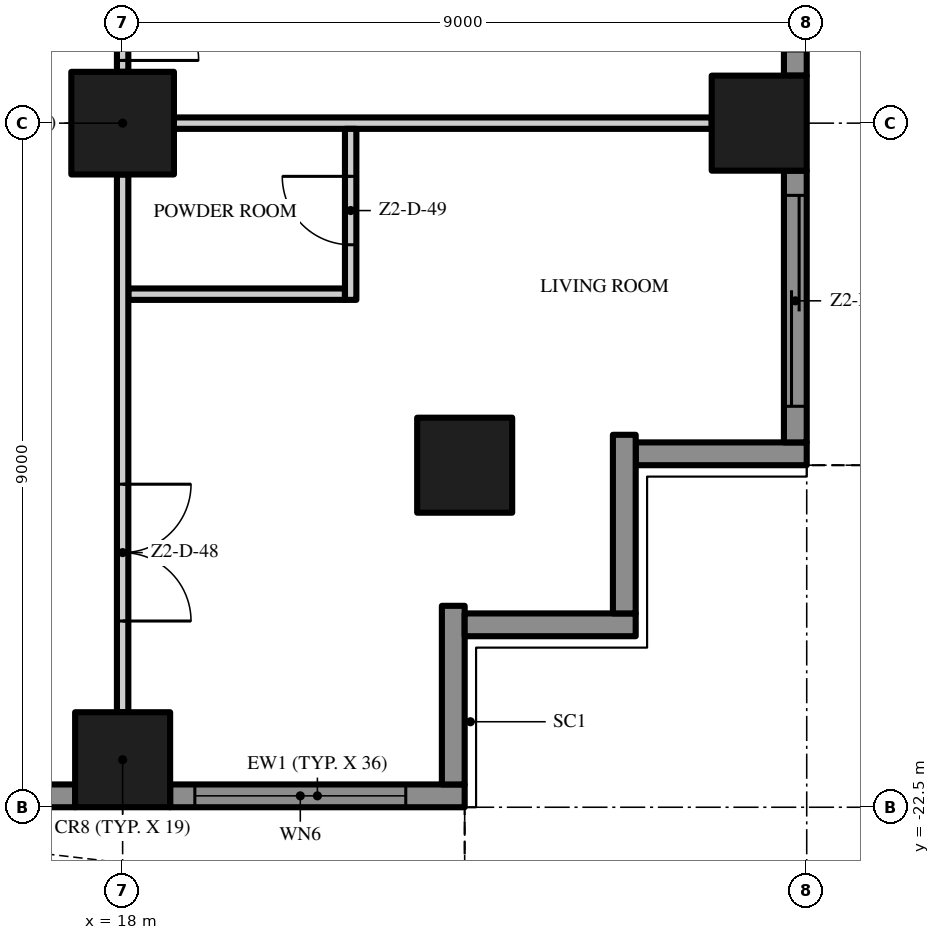
"""IFC4 building model, lengths in metres.
Left out: names, types, materials, properties, quantities, classifications, styles, units other than length and angle.
Written with IfcOpenShell. Run it as: python <this file> out.ifc"""

import sys

from ifc_helpers import new_model, si_unit, direction, frame, frame_2d, origin, origin_2d, place, context, subcontext, project, spatial, polyline, rectangle, outline, extrude, element, fill, save


model = new_model("IFC4")
c1 = context("Model", 3, precision=1e-05, world=origin(), true_north=direction((0.0, 1.0)))
c2 = subcontext(c1, "Body", "Model", "MODEL_VIEW")
j1 = project(units=[si_unit("LENGTHUNIT", "METRE"), si_unit("PLANEANGLEUNIT", "RADIAN")], contexts=[c1])
p1 = place(None, origin())
s1 = spatial("IfcSite", under=j1, at=p1, CompositionType="ELEMENT")
p2 = place(p1, origin())
s2 = spatial("IfcBuilding", under=s1, at=p2, CompositionType="ELEMENT")
p3 = place(p2, frame((0.0, 0.0, 111.2)))
s3 = spatial("IfcBuildingStorey", under=s2, at=p3, CompositionType="ELEMENT", Elevation=111.2)
p4 = place(p3, frame((18.0, -13.5, 0.0), z_axis=(0.0, 0.0, 1.0), x_axis=(1.0, 0.0, 0.0)))
e1 = element("IfcColumn", 1, at=p4, inside=s3, PredefinedType="COLUMN", context=c2, shape_type="SweptSolid", body=[
    extrude(rectangle(XDim=1.35, YDim=1.35, at=origin_2d()), origin(), (0.0, 0.0, 1.0), 3.5),
])
for number, where, z_axis, x_axis in (
    (2, (18.0, -21.875, 0.0), (0.0, 0.0, 1.0), (1.0, 0.0, 0.0)),
    (3, (26.375, -13.5, 0.0), (0.0, 0.0, 1.0), (1.0, 0.0, 0.0)),
    (4, (22.5, -18.0, 0.0), (0.0, 0.0, 1.0), (1.0, 0.0, 0.0)),
):
    element("IfcColumn", number, at=place(p3, frame(where, z_axis=z_axis, x_axis=x_axis)), inside=s3, PredefinedType="COLUMN", context=c2, shape_type="SweptSolid", body=[
        extrude(rectangle(XDim=1.25, YDim=1.25, at=origin_2d()), origin(), (0.0, 0.0, 1.0), 3.5),
    ])
p5 = place(p3, frame((17.375, -22.35, 0.0), z_axis=(0.0, 0.0, 1.0), x_axis=(-1.0, 0.0, 0.0)))
e5 = element("IfcWall", 5, at=p5, inside=s3, PredefinedType="SOLIDWALL", context=c2, shape_type="SweptSolid", body=[
    extrude(rectangle(XDim=7.75, YDim=0.3, at=frame_2d((3.875, 0.0))), origin(), (0.0, 0.0, 1.0), 3.5),
])
p6 = place(p5, frame((4.65, 0.0, 0.0)))
e6 = element("IfcOpeningElement", 6, at=p6, cuts=e5, PredefinedType="OPENING", context=c2, shape_type="SweptSolid", body=[
    extrude(rectangle(XDim=2.775, YDim=2.4, at=frame_2d((1.387, 1.2))), frame((0.0, 0.16, 0.0), z_axis=(0.0, -1.0, 0.0), x_axis=(1.0, 0.0, 0.0)), (0.0, 0.0, 1.0), 0.32),
])
p7 = place(p5, frame((0.325, 0.0, 0.45)))
e7 = element("IfcOpeningElement", 7, at=p7, cuts=e5, PredefinedType="OPENING", context=c2, shape_type="SweptSolid", body=[
    extrude(rectangle(XDim=2.775, YDim=2.65, at=frame_2d((1.387, 1.325))), frame((0.0, 0.16, 0.0), z_axis=(0.0, -1.0, 0.0), x_axis=(1.0, 0.0, 0.0)), (0.0, 0.0, 1.0), 0.32),
])
p8 = place(p3, frame((22.5, -22.35, 0.0), z_axis=(0.0, 0.0, 1.0), x_axis=(-1.0, 0.0, 0.0)))
e8 = element("IfcWall", 8, at=p8, inside=s3, PredefinedType="SOLIDWALL", context=c2, shape_type="SweptSolid", body=[
    extrude(rectangle(XDim=3.875, YDim=0.3, at=frame_2d((1.938, 0.0))), origin(), (0.0, 0.0, 1.0), 3.5),
])
p9 = place(p8, frame((0.775, 0.0, 0.45)))
e9 = element("IfcOpeningElement", 9, at=p9, cuts=e8, PredefinedType="OPENING", context=c2, shape_type="SweptSolid", body=[
    extrude(rectangle(XDim=2.775, YDim=2.65, at=frame_2d((1.387, 1.325))), frame((0.0, 0.16, 0.0), z_axis=(0.0, -1.0, 0.0), x_axis=(1.0, 0.0, 0.0)), (0.0, 0.0, 1.0), 0.32),
])
p10 = place(p3, frame((22.35, -19.85, 0.0), z_axis=(0.0, 0.0, 1.0), x_axis=(0.0, -1.0, 0.0)))
e10 = element("IfcWall", 10, at=p10, inside=s3, PredefinedType="SOLIDWALL", context=c2, shape_type="SweptSolid", body=[
    extrude(rectangle(XDim=2.35, YDim=0.3, at=frame_2d((1.175, 0.0))), origin(), (0.0, 0.0, 1.0), 3.5),
])
p11 = place(p3, frame((24.75, -20.1, 0.0), z_axis=(0.0, 0.0, 1.0), x_axis=(-1.0, 0.0, 0.0)))
e11 = element("IfcWall", 11, at=p11, inside=s3, PredefinedType="SOLIDWALL", context=c2, shape_type="SweptSolid", body=[
    extrude(rectangle(XDim=2.25, YDim=0.3, at=frame_2d((1.125, 0.0))), origin(), (0.0, 0.0, 1.0), 3.5),
])
p12 = place(p3, frame((24.6, -17.6, 0.0), z_axis=(0.0, 0.0, 1.0), x_axis=(0.0, -1.0, 0.0)))
e12 = element("IfcWall", 12, at=p12, inside=s3, PredefinedType="SOLIDWALL", context=c2, shape_type="SweptSolid", body=[
    extrude(rectangle(XDim=2.35, YDim=0.3, at=frame_2d((1.175, 0.0))), origin(), (0.0, 0.0, 1.0), 3.5),
])
p13 = place(p3, frame((27.0, -17.85, 0.0), z_axis=(0.0, 0.0, 1.0), x_axis=(-1.0, 0.0, 0.0)))
e13 = element("IfcWall", 13, at=p13, inside=s3, PredefinedType="SOLIDWALL", context=c2, shape_type="SweptSolid", body=[
    extrude(rectangle(XDim=2.25, YDim=0.3, at=frame_2d((1.125, 0.0))), origin(), (0.0, 0.0, 1.0), 3.5),
])
p14 = place(p3, frame((26.85, -14.125, 0.0), z_axis=(0.0, 0.0, 1.0), x_axis=(0.0, -1.0, 0.0)))
e14 = element("IfcWall", 14, at=p14, inside=s3, PredefinedType="SOLIDWALL", context=c2, shape_type="SweptSolid", body=[
    extrude(rectangle(XDim=3.575, YDim=0.3, at=frame_2d((1.788, 0.0))), origin(), (0.0, 0.0, 1.0), 3.5),
])
p15 = place(p14, frame((0.325, 0.0, 0.0)))
e15 = element("IfcOpeningElement", 15, at=p15, cuts=e14, PredefinedType="OPENING", context=c2, shape_type="SweptSolid", body=[
    extrude(rectangle(XDim=2.775, YDim=2.4, at=frame_2d((1.387, 1.2))), frame((0.0, 0.16, 0.0), z_axis=(0.0, -1.0, 0.0), x_axis=(1.0, 0.0, 0.0)), (0.0, 0.0, 1.0), 0.32),
])
p16 = place(p3, frame((26.85, -5.125, 0.0), z_axis=(0.0, 0.0, 1.0), x_axis=(0.0, -1.0, 0.0)))
e16 = element("IfcWall", 16, at=p16, inside=s3, PredefinedType="SOLIDWALL", context=c2, shape_type="SweptSolid", body=[
    extrude(rectangle(XDim=7.75, YDim=0.3, at=frame_2d((3.875, 0.0))), origin(), (0.0, 0.0, 1.0), 3.5),
])
p17 = place(p16, frame((4.65, 0.0, 0.45)))
e17 = element("IfcOpeningElement", 17, at=p17, cuts=e16, PredefinedType="OPENING", context=c2, shape_type="SweptSolid", body=[
    extrude(rectangle(XDim=2.775, YDim=2.65, at=frame_2d((1.387, 1.325))), frame((0.0, 0.16, 0.0), z_axis=(0.0, -1.0, 0.0), x_axis=(1.0, 0.0, 0.0)), (0.0, 0.0, 1.0), 0.32),
])
p18 = place(p16, frame((0.325, 0.0, 0.45)))
e18 = element("IfcOpeningElement", 18, at=p18, cuts=e16, PredefinedType="OPENING", context=c2, shape_type="SweptSolid", body=[
    extrude(rectangle(XDim=2.775, YDim=2.65, at=frame_2d((1.387, 1.325))), frame((0.0, 0.16, 0.0), z_axis=(0.0, -1.0, 0.0), x_axis=(1.0, 0.0, 0.0)), (0.0, 0.0, 1.0), 0.32),
])
p19 = place(p3, origin())
e19 = element("IfcWall", 19, at=p19, inside=s3, PredefinedType="USERDEFINED", context=c2, shape_type="SweptSolid", body=[
    extrude(outline(polyline([(-22.5, -25.149), (-21.0, -25.485), (-20.625, -25.5), (-19.5, -25.369), (-18.0, -24.845), (-16.5, -24.112), (-15.0, -23.451), (-13.5, -23.115), (-13.125, -23.1), (-12.0, -23.231), (-10.5, -23.755), (-9.0, -24.488), (-7.5, -25.149), (-6.0, -25.485), (-5.625, -25.5), (-4.5, -25.369), (-3.0, -24.845), (-1.5, -24.112), (0.0, -23.451), (1.5, -23.115), (1.875, -23.1), (3.0, -23.231), (4.5, -23.755), (6.0, -24.488), (7.5, -25.149), (9.0, -25.485), (9.375, -25.5), (10.5, -25.369), (12.0, -24.845), (13.5, -24.112), (15.0, -23.451), (16.5, -23.115), (16.875, -23.1), (18.0, -23.231), (19.5, -23.755), (21.0, -24.488), (22.5, -25.149), (22.601, -24.92), (21.105, -24.261), (19.596, -23.524), (18.056, -22.986), (16.885, -22.849), (16.467, -22.866), (14.921, -23.213), (13.395, -23.885), (11.904, -24.614), (10.444, -25.124), (9.365, -25.249), (9.033, -25.236), (7.579, -24.91), (6.105, -24.261), (4.596, -23.524), (3.056, -22.986), (1.885, -22.849), (1.467, -22.866), (-0.079, -23.213), (-1.605, -23.885), (-3.096, -24.614), (-4.556, -25.124), (-5.635, -25.249), (-5.967, -25.236), (-7.421, -24.91), (-8.895, -24.261), (-10.404, -23.524), (-11.944, -22.986), (-13.115, -22.849), (-13.533, -22.866), (-15.079, -23.213), (-16.605, -23.885), (-18.096, -24.614), (-19.556, -25.124), (-20.635, -25.249), (-20.967, -25.236), (-22.445, -24.905), (-22.5, -25.149)])), origin(), (0.0, 0.0, 1.0), 0.9),
])
p20 = place(p3, origin())
e20 = element("IfcWall", 20, at=p20, inside=s3, PredefinedType="USERDEFINED", context=c2, shape_type="SweptSolid", body=[
    extrude(outline(polyline([(29.649, -18.0), (29.985, -16.5), (30.0, -16.125), (29.869, -15.0), (29.345, -13.5), (28.612, -12.0), (27.951, -10.5), (27.615, -9.0), (27.6, -8.625), (27.731, -7.5), (28.255, -6.0), (28.988, -4.5), (29.649, -3.0), (29.985, -1.5), (30.0, -1.125), (29.869, 0.0), (29.345, 1.5), (28.612, 3.0), (27.951, 4.5), (27.615, 6.0), (27.6, 6.375), (27.731, 7.5), (28.255, 9.0), (28.988, 10.5), (29.649, 12.0), (29.985, 13.5), (30.0, 13.875), (29.869, 15.0), (29.345, 16.5), (28.612, 18.0), (28.388, 17.89), (29.114, 16.404), (29.624, 14.944), (29.749, 13.865), (29.736, 13.533), (29.41, 12.079), (28.761, 10.605), (28.024, 9.096), (27.486, 7.556), (27.349, 6.385), (27.366, 5.967), (27.713, 4.421), (28.385, 2.895), (29.114, 1.404), (29.624, -0.056), (29.749, -1.135), (29.736, -1.467), (29.41, -2.921), (28.761, -4.395), (28.024, -5.904), (27.486, -7.444), (27.349, -8.615), (27.366, -9.033), (27.713, -10.579), (28.385, -12.105), (29.114, -13.596), (29.624, -15.056), (29.749, -16.135), (29.736, -16.467), (29.405, -17.945), (29.649, -18.0)])), origin(), (0.0, 0.0, 1.0), 0.9),
])
p21 = place(p3, frame((18.075, -15.75, 0.0), z_axis=(0.0, 0.0, 1.0), x_axis=(1.0, 0.0, 0.0)))
e21 = element("IfcWall", 21, at=p21, inside=s3, PredefinedType="PARTITIONING", context=c2, shape_type="SweptSolid", body=[
    extrude(rectangle(XDim=2.85, YDim=0.15, at=frame_2d((1.425, 0.0))), origin(), (0.0, 0.0, 1.0), 3.5),
])
p22 = place(p3, frame((18.675, -13.5, 0.0), z_axis=(0.0, 0.0, 1.0), x_axis=(1.0, 0.0, 0.0)))
e22 = element("IfcWall", 22, at=p22, inside=s3, PredefinedType="PARTITIONING", context=c2, shape_type="SweptSolid", body=[
    extrude(rectangle(XDim=7.075, YDim=0.15, at=frame_2d((3.538, 0.0))), origin(), (0.0, 0.0, 1.0), 3.5),
])
p23 = place(p3, frame((18.0, -14.175, 0.0), z_axis=(0.0, 0.0, 1.0), x_axis=(0.0, -1.0, 0.0)))
e23 = element("IfcWall", 23, at=p23, inside=s3, PredefinedType="PARTITIONING", context=c2, shape_type="SweptSolid", body=[
    extrude(rectangle(XDim=7.075, YDim=0.15, at=frame_2d((3.538, 0.0))), origin(), (0.0, 0.0, 1.0), 3.5),
])
p24 = place(p23, frame((4.075, 0.0, 0.0)))
e24 = element("IfcOpeningElement", 24, at=p24, cuts=e23, PredefinedType="OPENING", context=c2, shape_type="SweptSolid", body=[
    extrude(rectangle(XDim=1.8, YDim=2.4, at=frame_2d((0.9, 1.2))), frame((0.0, 0.085, 0.0), z_axis=(0.0, -1.0, 0.0), x_axis=(1.0, 0.0, 0.0)), (0.0, 0.0, 1.0), 0.17),
])
p25 = place(p3, frame((18.0, -5.175, 0.0), z_axis=(0.0, 0.0, 1.0), x_axis=(0.0, -1.0, 0.0)))
e25 = element("IfcWall", 25, at=p25, inside=s3, PredefinedType="PARTITIONING", context=c2, shape_type="SweptSolid", body=[
    extrude(rectangle(XDim=7.65, YDim=0.15, at=frame_2d((3.825, 0.0))), origin(), (0.0, 0.0, 1.0), 3.5),
])
p26 = place(p25, frame((0.15, 0.0, 0.0)))
e26 = element("IfcOpeningElement", 26, at=p26, cuts=e25, PredefinedType="OPENING", context=c2, shape_type="SweptSolid", body=[
    extrude(rectangle(XDim=1.0, YDim=2.4, at=frame_2d((0.5, 1.2))), frame((0.0, 0.085, 0.0), z_axis=(0.0, -1.0, 0.0), x_axis=(1.0, 0.0, 0.0)), (0.0, 0.0, 1.0), 0.17),
])
p27 = place(p25, frame((6.5, 0.0, 0.0)))
e27 = element("IfcOpeningElement", 27, at=p27, cuts=e25, PredefinedType="OPENING", context=c2, shape_type="SweptSolid", body=[
    extrude(rectangle(XDim=1.0, YDim=2.4, at=frame_2d((0.5, 1.2))), frame((0.0, 0.085, 0.0), z_axis=(0.0, -1.0, 0.0), x_axis=(1.0, 0.0, 0.0)), (0.0, 0.0, 1.0), 0.17),
])
p28 = place(p3, frame((21.0, -15.825, 0.0), z_axis=(0.0, 0.0, 1.0), x_axis=(0.0, 1.0, 0.0)))
e28 = element("IfcWall", 28, at=p28, inside=s3, PredefinedType="PARTITIONING", context=c2, shape_type="SweptSolid", body=[
    extrude(rectangle(XDim=2.25, YDim=0.15, at=frame_2d((1.125, 0.0))), origin(), (0.0, 0.0, 1.0), 3.5),
])
p29 = place(p28, frame((0.725, 0.0, 0.0)))
e29 = element("IfcOpeningElement", 29, at=p29, cuts=e28, PredefinedType="OPENING", context=c2, shape_type="SweptSolid", body=[
    extrude(rectangle(XDim=0.9, YDim=2.1, at=frame_2d((0.45, 1.05))), frame((0.0, 0.085, 0.0), z_axis=(0.0, -1.0, 0.0), x_axis=(1.0, 0.0, 0.0)), (0.0, 0.0, 1.0), 0.17),
])
p30 = place(p9, origin())
e30 = element("IfcWindow", 30, at=p30, inside=s3, PartitioningType="SINGLE_PANEL", PredefinedType="WINDOW", context=c2, shape_type="SweptSolid", body=[
    extrude(rectangle(XDim=2.775, YDim=2.65, at=frame_2d((1.387, 1.325))), frame((0.0, 0.03, 0.0), z_axis=(0.0, -1.0, 0.0), x_axis=(1.0, 0.0, 0.0)), (0.0, 0.0, 1.0), 0.06),
])
fill(e9, e30)
p31 = place(p15, origin())
e31 = element("IfcDoor", 31, at=p31, inside=s3, OperationType="SINGLE_SWING_LEFT", PredefinedType="DOOR", context=c2, shape_type="SweptSolid", body=[
    extrude(rectangle(XDim=2.775, YDim=2.4, at=frame_2d((1.387, 1.2))), frame((0.0, 0.025, 0.0), z_axis=(0.0, -1.0, 0.0), x_axis=(1.0, 0.0, 0.0)), (0.0, 0.0, 1.0), 0.05),
])
fill(e15, e31)
p32 = place(p27, origin())
e32 = element("IfcDoor", 32, at=p32, inside=s3, OperationType="SINGLE_SWING_RIGHT", PredefinedType="DOOR", context=c2, shape_type="SweptSolid", body=[
    extrude(rectangle(XDim=1.0, YDim=2.4, at=frame_2d((0.5, 1.2))), frame((0.0, 0.025, 0.0), z_axis=(0.0, -1.0, 0.0), x_axis=(1.0, 0.0, 0.0)), (0.0, 0.0, 1.0), 0.05),
])
fill(e27, e32)
p33 = place(p24, origin())
e33 = element("IfcDoor", 33, at=p33, inside=s3, OperationType="DOUBLE_DOOR_SINGLE_SWING", PredefinedType="DOOR", context=c2, shape_type="SweptSolid", body=[
    extrude(rectangle(XDim=1.8, YDim=2.4, at=frame_2d((0.9, 1.2))), frame((0.0, 0.025, 0.0), z_axis=(0.0, -1.0, 0.0), x_axis=(1.0, 0.0, 0.0)), (0.0, 0.0, 1.0), 0.05),
])
fill(e24, e33)
p34 = place(p29, origin())
e34 = element("IfcDoor", 34, at=p34, inside=s3, OperationType="SINGLE_SWING_RIGHT", PredefinedType="DOOR", context=c2, shape_type="SweptSolid", body=[
    extrude(rectangle(XDim=0.9, YDim=2.1, at=frame_2d((0.45, 1.05))), frame((0.0, 0.025, 0.0), z_axis=(0.0, -1.0, 0.0), x_axis=(1.0, 0.0, 0.0)), (0.0, 0.0, 1.0), 0.05),
])
fill(e29, e34)
save(model, sys.argv[1])
